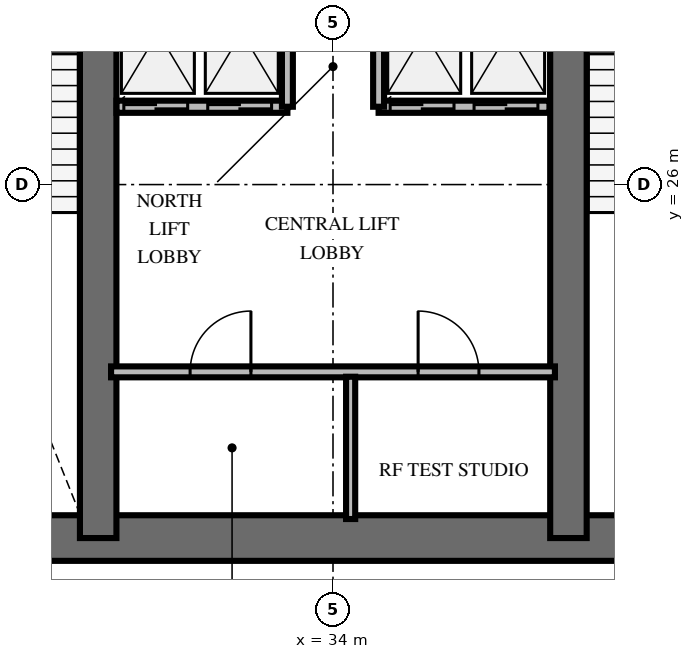
"""IFC4 building model, lengths in metres.
Left out: names, types, materials, properties, quantities, classifications, styles, units other than length and angle.
Written with IfcOpenShell. Run it as: python <this file> out.ifc"""

import sys

from ifc_helpers import new_model, si_unit, direction, frame, frame_2d, origin, place, context, subcontext, project, spatial, rectangle, extrude, element, fill, save


model = new_model("IFC4")
c1 = context("Model", 3, precision=1e-05, world=origin(), true_north=direction((0.0, 1.0)))
c2 = subcontext(c1, "Body", "Model", "MODEL_VIEW")
j1 = project(units=[si_unit("LENGTHUNIT", "METRE"), si_unit("PLANEANGLEUNIT", "RADIAN")], contexts=[c1])
p1 = place(None, origin())
s1 = spatial("IfcSite", under=j1, at=p1, CompositionType="ELEMENT")
p2 = place(p1, origin())
s2 = spatial("IfcBuilding", under=s1, at=p2, CompositionType="ELEMENT")
p3 = place(p2, frame((0.0, 0.0, 195.2)))
s3 = spatial("IfcBuildingStorey", under=s2, at=p3, CompositionType="ELEMENT", Elevation=195.2)
p4 = place(p3, frame((26.072, 20.187, 0.0), z_axis=(0.0, 0.0, 1.0), x_axis=(1.0, 0.0, 0.0)))
e1 = element("IfcWall", 1, at=p4, inside=s3, PredefinedType="SHEAR", context=c2, shape_type="SweptSolid", body=[
    extrude(rectangle(XDim=15.866, YDim=0.75, at=frame_2d((7.933, 0.0))), origin(), (0.0, 0.0, 1.0), 3.6),
])
for number, where, z_axis, x_axis in (
    (2, (30.138, 20.187, 0.0), (0.0, 0.0, 1.0), (0.0, 1.0, 0.0)),
    (3, (37.872, 20.187, 0.0), (0.0, 0.0, 1.0), (0.0, 1.0, 0.0)),
):
    element("IfcWall", number, at=place(p3, frame(where, z_axis=z_axis, x_axis=x_axis)), inside=s3, PredefinedType="SHEAR", context=c2, shape_type="SweptSolid", body=[
        extrude(rectangle(XDim=9.826, YDim=0.6, at=frame_2d((4.913, 0.0))), origin(), (0.0, 0.0, 1.0), 3.6),
    ])
p5 = place(p3, frame((30.35, 22.92, 0.0), z_axis=(0.0, 0.0, 1.0), x_axis=(1.0, 0.0, 0.0)))
e4 = element("IfcWall", 4, at=p5, inside=s3, PredefinedType="PARTITIONING", context=c2, shape_type="SweptSolid", body=[
    extrude(rectangle(XDim=7.3, YDim=0.18, at=frame_2d((3.65, 0.0))), origin(), (0.0, 0.0, 1.0), 2.46),
])
p6 = place(p5, frame((1.3, 0.0, 0.0)))
e5 = element("IfcOpeningElement", 5, at=p6, cuts=e4, PredefinedType="OPENING", context=c2, shape_type="SweptSolid", body=[
    extrude(rectangle(XDim=1.0, YDim=2.15, at=frame_2d((0.5, 1.075))), frame((0.0, 0.1, 0.0), z_axis=(0.0, -1.0, 0.0), x_axis=(1.0, 0.0, 0.0)), (0.0, 0.0, 1.0), 0.2),
])
p7 = place(p5, frame((5.05, 0.0, 0.0)))
e6 = element("IfcOpeningElement", 6, at=p7, cuts=e4, PredefinedType="OPENING", context=c2, shape_type="SweptSolid", body=[
    extrude(rectangle(XDim=1.0, YDim=2.15, at=frame_2d((0.5, 1.075))), frame((0.0, 0.1, 0.0), z_axis=(0.0, -1.0, 0.0), x_axis=(1.0, 0.0, 0.0)), (0.0, 0.0, 1.0), 0.2),
])
p8 = place(p3, frame((34.29, 20.5, 0.0), z_axis=(0.0, 0.0, 1.0), x_axis=(0.0, 1.0, 0.0)))
e7 = element("IfcWall", 7, at=p8, inside=s3, PredefinedType="PARTITIONING", context=c2, shape_type="SweptSolid", body=[
    extrude(rectangle(XDim=2.34, YDim=0.15, at=frame_2d((1.17, 0.0))), origin(), (0.0, 0.0, 1.0), 2.46),
])
p9 = place(p3, frame((30.44, 27.28, 0.0), z_axis=(0.0, 0.0, 1.0), x_axis=(1.0, 0.0, 0.0)))
e8 = element("IfcWall", 8, at=p9, inside=s3, PredefinedType="SOLIDWALL", context=c2, shape_type="SweptSolid", body=[
    extrude(rectangle(XDim=2.81, YDim=0.2, at=frame_2d((1.405, 0.0))), origin(), (0.0, 0.0, 1.0), 2.46),
])
p10 = place(p9, frame((0.12, 0.0, 0.0)))
e9 = element("IfcOpeningElement", 9, at=p10, cuts=e8, PredefinedType="OPENING", context=c2, shape_type="SweptSolid", body=[
    extrude(rectangle(XDim=1.05, YDim=2.1, at=frame_2d((0.525, 1.05))), frame((0.0, 0.11, 0.0), z_axis=(0.0, -1.0, 0.0), x_axis=(1.0, 0.0, 0.0)), (0.0, 0.0, 1.0), 0.22),
])
p11 = place(p9, frame((1.5, 0.0, 0.0)))
e10 = element("IfcOpeningElement", 10, at=p11, cuts=e8, PredefinedType="OPENING", context=c2, shape_type="SweptSolid", body=[
    extrude(rectangle(XDim=1.05, YDim=2.1, at=frame_2d((0.525, 1.05))), frame((0.0, 0.11, 0.0), z_axis=(0.0, -1.0, 0.0), x_axis=(1.0, 0.0, 0.0)), (0.0, 0.0, 1.0), 0.22),
])
p12 = place(p3, frame((33.25, 27.28, 0.0), z_axis=(0.0, 0.0, 1.0), x_axis=(0.0, 1.0, 0.0)))
e11 = element("IfcWall", 11, at=p12, inside=s3, PredefinedType="SOLIDWALL", context=c2, shape_type="SweptSolid", body=[
    extrude(rectangle(XDim=2.47, YDim=0.18, at=frame_2d((1.235, 0.0))), origin(), (0.0, 0.0, 1.0), 2.46),
])
p13 = place(p3, frame((34.75, 27.28, 0.0), z_axis=(0.0, 0.0, 1.0), x_axis=(1.0, 0.0, 0.0)))
e12 = element("IfcWall", 12, at=p13, inside=s3, PredefinedType="SOLIDWALL", context=c2, shape_type="SweptSolid", body=[
    extrude(rectangle(XDim=2.81, YDim=0.2, at=frame_2d((1.405, 0.0))), origin(), (0.0, 0.0, 1.0), 2.46),
])
p14 = place(p13, frame((0.19, 0.0, 0.0)))
e13 = element("IfcOpeningElement", 13, at=p14, cuts=e12, PredefinedType="OPENING", context=c2, shape_type="SweptSolid", body=[
    extrude(rectangle(XDim=1.05, YDim=2.1, at=frame_2d((0.525, 1.05))), frame((0.0, 0.11, 0.0), z_axis=(0.0, -1.0, 0.0), x_axis=(1.0, 0.0, 0.0)), (0.0, 0.0, 1.0), 0.22),
])
p15 = place(p13, frame((1.57, 0.0, 0.0)))
e14 = element("IfcOpeningElement", 14, at=p15, cuts=e12, PredefinedType="OPENING", context=c2, shape_type="SweptSolid", body=[
    extrude(rectangle(XDim=1.05, YDim=2.1, at=frame_2d((0.525, 1.05))), frame((0.0, 0.11, 0.0), z_axis=(0.0, -1.0, 0.0), x_axis=(1.0, 0.0, 0.0)), (0.0, 0.0, 1.0), 0.22),
])
p16 = place(p3, frame((34.75, 27.28, 0.0), z_axis=(0.0, 0.0, 1.0), x_axis=(0.0, 1.0, 0.0)))
e15 = element("IfcWall", 15, at=p16, inside=s3, PredefinedType="SOLIDWALL", context=c2, shape_type="SweptSolid", body=[
    extrude(rectangle(XDim=2.47, YDim=0.18, at=frame_2d((1.235, 0.0))), origin(), (0.0, 0.0, 1.0), 2.46),
])
p17 = place(p6, origin())
e16 = element("IfcDoor", 16, at=p17, inside=s3, OperationType="SINGLE_SWING_RIGHT", PredefinedType="DOOR", context=c2, shape_type="SweptSolid", body=[
    extrude(rectangle(XDim=1.0, YDim=2.15, at=frame_2d((0.5, 1.075))), frame((0.0, 0.025, 0.0), z_axis=(0.0, -1.0, 0.0), x_axis=(1.0, 0.0, 0.0)), (0.0, 0.0, 1.0), 0.05),
])
fill(e5, e16)
p18 = place(p7, origin())
e17 = element("IfcDoor", 17, at=p18, inside=s3, OperationType="SINGLE_SWING_LEFT", PredefinedType="DOOR", context=c2, shape_type="SweptSolid", body=[
    extrude(rectangle(XDim=1.0, YDim=2.15, at=frame_2d((0.5, 1.075))), frame((0.0, 0.025, 0.0), z_axis=(0.0, -1.0, 0.0), x_axis=(1.0, 0.0, 0.0)), (0.0, 0.0, 1.0), 0.05),
])
fill(e6, e17)
p19 = place(p10, origin())
e18 = element("IfcDoor", 18, at=p19, inside=s3, OperationType="DOUBLE_DOOR_SLIDING", PredefinedType="USERDEFINED", context=c2, shape_type="SweptSolid", body=[
    extrude(rectangle(XDim=1.05, YDim=2.1, at=frame_2d((0.525, 1.05))), frame((0.0, 0.025, 0.0), z_axis=(0.0, -1.0, 0.0), x_axis=(1.0, 0.0, 0.0)), (0.0, 0.0, 1.0), 0.05),
])
fill(e9, e18)
p20 = place(p11, origin())
e19 = element("IfcDoor", 19, at=p20, inside=s3, OperationType="DOUBLE_DOOR_SLIDING", PredefinedType="USERDEFINED", context=c2, shape_type="SweptSolid", body=[
    extrude(rectangle(XDim=1.05, YDim=2.1, at=frame_2d((0.525, 1.05))), frame((0.0, 0.025, 0.0), z_axis=(0.0, -1.0, 0.0), x_axis=(1.0, 0.0, 0.0)), (0.0, 0.0, 1.0), 0.05),
])
fill(e10, e19)
p21 = place(p14, origin())
e20 = element("IfcDoor", 20, at=p21, inside=s3, OperationType="DOUBLE_DOOR_SLIDING", PredefinedType="USERDEFINED", context=c2, shape_type="SweptSolid", body=[
    extrude(rectangle(XDim=1.05, YDim=2.1, at=frame_2d((0.525, 1.05))), frame((0.0, 0.025, 0.0), z_axis=(0.0, -1.0, 0.0), x_axis=(1.0, 0.0, 0.0)), (0.0, 0.0, 1.0), 0.05),
])
fill(e13, e20)
p22 = place(p15, origin())
e21 = element("IfcDoor", 21, at=p22, inside=s3, OperationType="DOUBLE_DOOR_SLIDING", PredefinedType="USERDEFINED", context=c2, shape_type="SweptSolid", body=[
    extrude(rectangle(XDim=1.05, YDim=2.1, at=frame_2d((0.525, 1.05))), frame((0.0, 0.025, 0.0), z_axis=(0.0, -1.0, 0.0), x_axis=(1.0, 0.0, 0.0)), (0.0, 0.0, 1.0), 0.05),
])
fill(e14, e21)
save(model, sys.argv[1])
